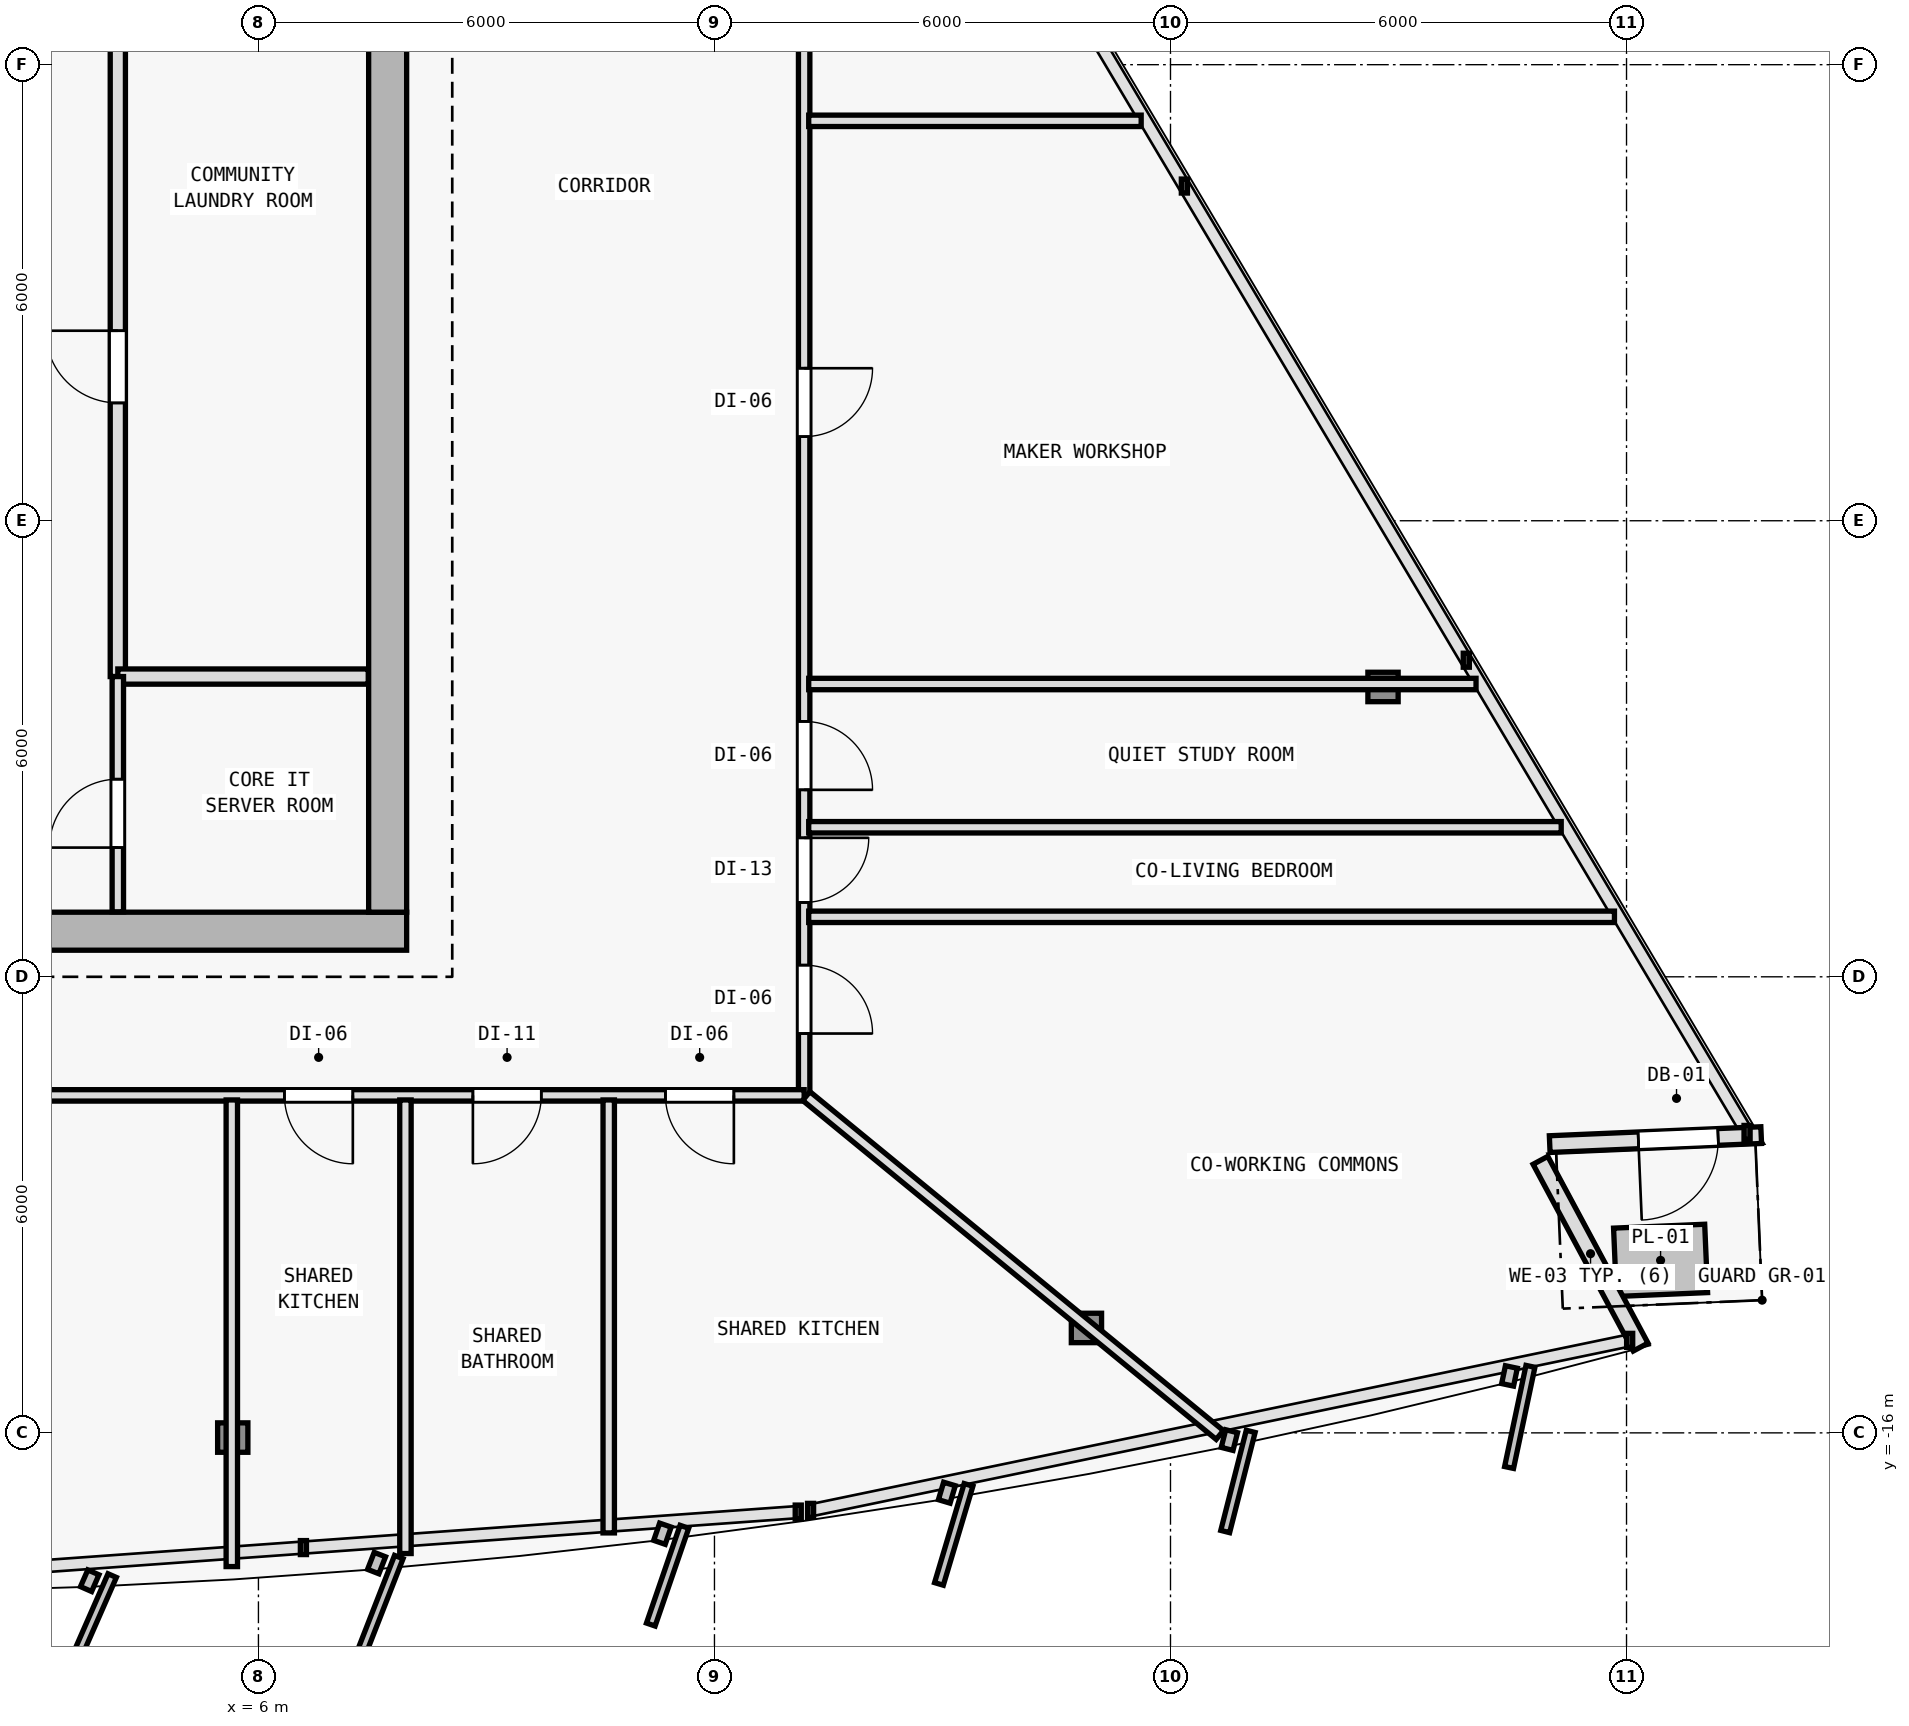
"""IFC4 building model, lengths in metres.
Left out: names, types, materials, properties, quantities, classifications, styles, units other than length and angle.
Written with IfcOpenShell. Run it as: python <this file> out.ifc"""

import sys

from ifc_helpers import new_model, si_unit, direction, frame, frame_2d, origin, origin_2d, place, context, subcontext, project, spatial, rectangle, i_section, extrude, element, fill, save


model = new_model("IFC4")
c1 = context("Model", 3, precision=1e-05, world=origin(), true_north=direction((0.0, 1.0)))
c2 = subcontext(c1, "Body", "Model", "MODEL_VIEW")
j1 = project(units=[si_unit("LENGTHUNIT", "METRE"), si_unit("PLANEANGLEUNIT", "RADIAN")], contexts=[c1])
p1 = place(None, origin())
s1 = spatial("IfcSite", under=j1, at=p1, CompositionType="ELEMENT")
p2 = place(p1, origin())
s2 = spatial("IfcBuilding", under=s1, at=p2, CompositionType="ELEMENT")
p3 = place(p2, frame((0.0, 0.0, 201.9)))
s3 = spatial("IfcBuildingStorey", under=s2, at=p3, CompositionType="ELEMENT", Elevation=201.9)
for number, where, z_axis, x_axis in (
    (1, (7.7, -9.4, 0.0), (0.0, 0.0, 1.0), (1.0, 0.0, 0.0)),
    (2, (7.7, 0.4, 0.0), (0.0, 0.0, 1.0), (1.0, 0.0, 0.0)),
):
    element("IfcColumn", number, at=place(p3, frame(where, z_axis=z_axis, x_axis=x_axis)), inside=s3, PredefinedType="COLUMN", context=c2, shape_type="SweptSolid", body=[
        extrude(i_section(OverallWidth=0.398, OverallDepth=0.387, WebThickness=0.013, FlangeThickness=0.022, FilletRadius=0.015, at=origin_2d()), origin(), (0.0, 0.0, 1.0), 3.6),
    ])
p4 = place(p3, frame((5.662, -16.062, 0.006), z_axis=(-0.006934304776, 0.03521539092, 0.999355688261), x_axis=(-0.981159154887, -0.193201223549, 0.0)))
e3 = element("IfcColumn", 3, at=p4, inside=s3, PredefinedType="COLUMN", context=c2, shape_type="SweptSolid", body=[
    extrude(i_section(OverallWidth=0.398, OverallDepth=0.387, WebThickness=0.013, FlangeThickness=0.022, FilletRadius=0.015, at=origin_2d()), origin(), (0.0, 0.0, 1.0), 3.591),
])
p5 = place(p3, frame((16.894, -14.62, 0.006), z_axis=(-0.020596339702, 0.033443561496, 0.99922836178), x_axis=(-0.851480003019, -0.52438707503, 0.0)))
e4 = element("IfcColumn", 4, at=p5, inside=s3, PredefinedType="COLUMN", context=c2, shape_type="SweptSolid", body=[
    extrude(i_section(OverallWidth=0.398, OverallDepth=0.387, WebThickness=0.013, FlangeThickness=0.022, FilletRadius=0.015, at=origin_2d()), origin(), (0.0, 0.0, 1.0), 3.592),
])
p6 = place(p3, frame((20.796, -6.187, 0.006), z_axis=(-0.026107436898, 0.021620221181, 0.999425318758), x_axis=(-0.637813971185, -0.770190455771, 0.0)))
e5 = element("IfcColumn", 5, at=p6, inside=s3, PredefinedType="COLUMN", context=c2, shape_type="SweptSolid", body=[
    extrude(i_section(OverallWidth=0.398, OverallDepth=0.387, WebThickness=0.013, FlangeThickness=0.022, FilletRadius=0.015, at=origin_2d()), origin(), (0.0, 0.0, 1.0), 3.591),
])
p7 = place(p3, frame((22.868, -12.415, 0.0), z_axis=(0.0, 0.0, 1.0), x_axis=(0.472845900162, -0.881145138272, 0.0)))
e6 = element("IfcWall", 6, at=p7, inside=s3, PredefinedType="SOLIDWALL", context=c2, shape_type="SweptSolid", body=[
    extrude(rectangle(XDim=2.788, YDim=0.22, at=frame_2d((1.394, 0.0))), origin(), (0.0, 0.0, 1.0), 3.35),
])
p8 = place(p3, frame((25.772, -12.083, 0.0), z_axis=(0.0, 0.0, 1.0), x_axis=(-0.999095761456, -0.042516578425, 0.0)))
e7 = element("IfcWall", 7, at=p8, inside=s3, PredefinedType="SOLIDWALL", context=c2, shape_type="SweptSolid", body=[
    extrude(rectangle(XDim=2.785, YDim=0.22, at=frame_2d((1.393, 0.0))), origin(), (0.0, 0.0, 1.0), 3.35),
])
p9 = place(p8, frame((0.567, 0.0, 0.0)))
e8 = element("IfcOpeningElement", 8, at=p9, cuts=e7, PredefinedType="OPENING", context=c2, shape_type="SweptSolid", body=[
    extrude(rectangle(XDim=1.05, YDim=2.15, at=frame_2d((0.525, 1.075))), frame((0.0, 0.12, 0.0), z_axis=(0.0, -1.0, 0.0), x_axis=(1.0, 0.0, 0.0)), (0.0, 0.0, 1.0), 0.24),
])
p10 = place(p3, frame((-7.95, -9.4, 0.0), z_axis=(0.0, 0.0, 1.0), x_axis=(1.0, 0.0, 0.0)))
e9 = element("IfcWall", 9, at=p10, inside=s3, PredefinedType="SHEAR", context=c2, shape_type="SweptSolid", body=[
    extrude(rectangle(XDim=15.9, YDim=0.5, at=frame_2d((7.95, 0.0))), origin(), (0.0, 0.0, 1.0), 3.35),
])
p11 = place(p10, frame((9.6, 0.0, 0.0)))
e10 = element("IfcOpeningElement", 10, at=p11, cuts=e9, PredefinedType="OPENING", context=c2, shape_type="SweptSolid", body=[
    extrude(rectangle(XDim=1.5, YDim=2.2, at=frame_2d((0.75, 1.1))), frame((0.0, 0.26, 0.0), z_axis=(0.0, -1.0, 0.0), x_axis=(1.0, 0.0, 0.0)), (0.0, 0.0, 1.0), 0.52),
])
p12 = place(p3, frame((7.7, 9.95, 0.0), z_axis=(0.0, 0.0, 1.0), x_axis=(0.0, -1.0, 0.0)))
e11 = element("IfcWall", 11, at=p12, inside=s3, PredefinedType="SHEAR", context=c2, shape_type="SweptSolid", body=[
    extrude(rectangle(XDim=19.1, YDim=0.5, at=frame_2d((9.55, 0.0))), origin(), (0.0, 0.0, 1.0), 3.35),
])
p13 = place(p3, frame((4.15, -6.05, 0.0), z_axis=(0.0, 0.0, 1.0), x_axis=(0.0, 1.0, 0.0)))
e12 = element("IfcWall", 12, at=p13, inside=s3, PredefinedType="SOLIDWALL", context=c2, shape_type="SweptSolid", body=[
    extrude(rectangle(XDim=8.7, YDim=0.2, at=frame_2d((4.35, 0.0))), origin(), (0.0, 0.0, 1.0), 3.35),
])
p14 = place(p13, frame((3.6, 0.0, 0.0)))
e13 = element("IfcOpeningElement", 13, at=p14, cuts=e12, PredefinedType="OPENING", context=c2, shape_type="SweptSolid", body=[
    extrude(rectangle(XDim=0.95, YDim=2.1, at=frame_2d((0.475, 1.05))), frame((0.0, 0.11, 0.0), z_axis=(0.0, -1.0, 0.0), x_axis=(1.0, 0.0, 0.0)), (0.0, 0.0, 1.0), 0.22),
])
p15 = place(p3, frame((4.15, -6.05, 0.0), z_axis=(0.0, 0.0, 1.0), x_axis=(1.0, 0.0, 0.0)))
e14 = element("IfcWall", 14, at=p15, inside=s3, PredefinedType="SOLIDWALL", context=c2, shape_type="SweptSolid", body=[
    extrude(rectangle(XDim=3.295, YDim=0.2, at=frame_2d((1.647, 0.0))), origin(), (0.0, 0.0, 1.0), 3.35),
])
p16 = place(p3, frame((4.15, -9.145, 0.0), z_axis=(0.0, 0.0, 1.0), x_axis=(0.0, 1.0, 0.0)))
e15 = element("IfcWall", 15, at=p16, inside=s3, PredefinedType="PARTITIONING", context=c2, shape_type="SweptSolid", body=[
    extrude(rectangle(XDim=3.095, YDim=0.15, at=frame_2d((1.547, 0.0))), origin(), (0.0, 0.0, 1.0), 3.35),
])
p17 = place(p16, frame((0.845, 0.0, 0.0)))
e16 = element("IfcOpeningElement", 16, at=p17, cuts=e15, PredefinedType="OPENING", context=c2, shape_type="SweptSolid", body=[
    extrude(rectangle(XDim=0.9, YDim=2.1, at=frame_2d((0.45, 1.05))), frame((0.0, 0.085, 0.0), z_axis=(0.0, -1.0, 0.0), x_axis=(1.0, 0.0, 0.0)), (0.0, 0.0, 1.0), 0.17),
])
p18 = place(p3, frame((13.18, 8.444, 0.0), z_axis=(0.0, 0.0, 1.0), x_axis=(0.0, -1.0, 0.0)))
e17 = element("IfcWall", 17, at=p18, inside=s3, PredefinedType="PARTITIONING", context=c2, shape_type="SweptSolid", body=[
    extrude(rectangle(XDim=20.004, YDim=0.15, at=frame_2d((10.002, 0.0))), origin(), (0.0, 0.0, 1.0), 2.825),
])
p19 = place(p18, frame((18.29, 0.0, 0.0)))
e18 = element("IfcOpeningElement", 18, at=p19, cuts=e17, PredefinedType="OPENING", context=c2, shape_type="SweptSolid", body=[
    extrude(rectangle(XDim=0.9, YDim=2.1, at=frame_2d((0.45, 1.05))), frame((0.0, 0.085, 0.0), z_axis=(0.0, -1.0, 0.0), x_axis=(1.0, 0.0, 0.0)), (0.0, 0.0, 1.0), 0.17),
])
p20 = place(p18, frame((16.615, 0.0, 0.0)))
e19 = element("IfcOpeningElement", 19, at=p20, cuts=e17, PredefinedType="OPENING", context=c2, shape_type="SweptSolid", body=[
    extrude(rectangle(XDim=0.85, YDim=2.1, at=frame_2d((0.425, 1.05))), frame((0.0, 0.085, 0.0), z_axis=(0.0, -1.0, 0.0), x_axis=(1.0, 0.0, 0.0)), (0.0, 0.0, 1.0), 0.17),
])
p21 = place(p18, frame((15.084, 0.0, 0.0)))
e20 = element("IfcOpeningElement", 20, at=p21, cuts=e17, PredefinedType="OPENING", context=c2, shape_type="SweptSolid", body=[
    extrude(rectangle(XDim=0.9, YDim=2.1, at=frame_2d((0.45, 1.05))), frame((0.0, 0.085, 0.0), z_axis=(0.0, -1.0, 0.0), x_axis=(1.0, 0.0, 0.0)), (0.0, 0.0, 1.0), 0.17),
])
p22 = place(p18, frame((10.437, 0.0, 0.0)))
e21 = element("IfcOpeningElement", 21, at=p22, cuts=e17, PredefinedType="OPENING", context=c2, shape_type="SweptSolid", body=[
    extrude(rectangle(XDim=0.9, YDim=2.1, at=frame_2d((0.45, 1.05))), frame((0.0, 0.085, 0.0), z_axis=(0.0, -1.0, 0.0), x_axis=(1.0, 0.0, 0.0)), (0.0, 0.0, 1.0), 0.17),
])
p23 = place(p3, frame((13.18, -11.56, 0.0), z_axis=(0.0, 0.0, 1.0), x_axis=(-1.0, 0.0, 0.0)))
e22 = element("IfcWall", 22, at=p23, inside=s3, PredefinedType="PARTITIONING", context=c2, shape_type="SweptSolid", body=[
    extrude(rectangle(XDim=23.04, YDim=0.15, at=frame_2d((11.52, 0.0))), origin(), (0.0, 0.0, 1.0), 2.775),
])
p24 = place(p23, frame((14.436, 0.0, 0.0)))
e23 = element("IfcOpeningElement", 23, at=p24, cuts=e22, PredefinedType="OPENING", context=c2, shape_type="SweptSolid", body=[
    extrude(rectangle(XDim=0.9, YDim=2.1, at=frame_2d((0.45, 1.05))), frame((0.0, 0.085, 0.0), z_axis=(0.0, -1.0, 0.0), x_axis=(1.0, 0.0, 0.0)), (0.0, 0.0, 1.0), 0.17),
])
p25 = place(p23, frame((5.938, 0.0, 0.0)))
e24 = element("IfcOpeningElement", 24, at=p25, cuts=e22, PredefinedType="OPENING", context=c2, shape_type="SweptSolid", body=[
    extrude(rectangle(XDim=0.9, YDim=2.1, at=frame_2d((0.45, 1.05))), frame((0.0, 0.085, 0.0), z_axis=(0.0, -1.0, 0.0), x_axis=(1.0, 0.0, 0.0)), (0.0, 0.0, 1.0), 0.17),
])
p26 = place(p23, frame((3.458, 0.0, 0.0)))
e25 = element("IfcOpeningElement", 25, at=p26, cuts=e22, PredefinedType="OPENING", context=c2, shape_type="SweptSolid", body=[
    extrude(rectangle(XDim=0.9, YDim=2.1, at=frame_2d((0.45, 1.05))), frame((0.0, 0.085, 0.0), z_axis=(0.0, -1.0, 0.0), x_axis=(1.0, 0.0, 0.0)), (0.0, 0.0, 1.0), 0.17),
])
p27 = place(p23, frame((0.925, 0.0, 0.0)))
e26 = element("IfcOpeningElement", 26, at=p27, cuts=e22, PredefinedType="OPENING", context=c2, shape_type="SweptSolid", body=[
    extrude(rectangle(XDim=0.9, YDim=2.1, at=frame_2d((0.45, 1.05))), frame((0.0, 0.085, 0.0), z_axis=(0.0, -1.0, 0.0), x_axis=(1.0, 0.0, 0.0)), (0.0, 0.0, 1.0), 0.17),
])
p28 = place(p3, frame((5.65, -11.62, 0.0), z_axis=(0.0, 0.0, 1.0), x_axis=(0.0, -1.0, 0.0)))
e27 = element("IfcWall", 27, at=p28, inside=s3, PredefinedType="PARTITIONING", context=c2, shape_type="SweptSolid", body=[
    extrude(rectangle(XDim=6.139, YDim=0.15, at=frame_2d((3.07, 0.0))), origin(), (0.0, 0.0, 1.0), 2.775),
])
p29 = place(p3, frame((13.208, -11.569, 0.0), z_axis=(0.0, 0.0, 1.0), x_axis=(0.773432829445, -0.633878267758, 0.0)))
e28 = element("IfcWall", 28, at=p29, inside=s3, PredefinedType="PARTITIONING", context=c2, shape_type="SweptSolid", body=[
    extrude(rectangle(XDim=7.034, YDim=0.15, at=frame_2d((3.517, 0.0))), origin(), (0.0, 0.0, 1.0), 2.825),
])
p30 = place(p3, frame((13.24, -6.148, 0.0), z_axis=(0.0, 0.0, 1.0), x_axis=(1.0, 0.0, 0.0)))
e29 = element("IfcWall", 29, at=p30, inside=s3, PredefinedType="PARTITIONING", context=c2, shape_type="SweptSolid", body=[
    extrude(rectangle(XDim=8.78, YDim=0.15, at=frame_2d((4.39, 0.0))), origin(), (0.0, 0.0, 1.0), 2.825),
])
p31 = place(p3, frame((10.609, -11.62, 0.0), z_axis=(0.0, 0.0, 1.0), x_axis=(0.0, -1.0, 0.0)))
e30 = element("IfcWall", 30, at=p31, inside=s3, PredefinedType="PARTITIONING", context=c2, shape_type="SweptSolid", body=[
    extrude(rectangle(XDim=5.696, YDim=0.15, at=frame_2d((2.848, 0.0))), origin(), (0.0, 0.0, 1.0), 2.875),
])
p32 = place(p3, frame((13.24, -9.211, 0.0), z_axis=(0.0, 0.0, 1.0), x_axis=(1.0, 0.0, 0.0)))
e31 = element("IfcWall", 31, at=p32, inside=s3, PredefinedType="PARTITIONING", context=c2, shape_type="SweptSolid", body=[
    extrude(rectangle(XDim=10.601, YDim=0.15, at=frame_2d((5.301, 0.0))), origin(), (0.0, 0.0, 1.0), 2.935),
])
p33 = place(p3, frame((7.934, -11.62, 0.0), z_axis=(0.0, 0.0, 1.0), x_axis=(0.0, -1.0, 0.0)))
e32 = element("IfcWall", 32, at=p33, inside=s3, PredefinedType="PARTITIONING", context=c2, shape_type="SweptSolid", body=[
    extrude(rectangle(XDim=5.968, YDim=0.15, at=frame_2d((2.984, 0.0))), origin(), (0.0, 0.0, 1.0), 2.875),
])
p34 = place(p3, frame((13.24, -8.033, 0.0), z_axis=(0.0, 0.0, 1.0), x_axis=(1.0, 0.0, 0.0)))
e33 = element("IfcWall", 33, at=p34, inside=s3, PredefinedType="PARTITIONING", context=c2, shape_type="SweptSolid", body=[
    extrude(rectangle(XDim=9.901, YDim=0.15, at=frame_2d((4.95, 0.0))), origin(), (0.0, 0.0, 1.0), 2.825),
])
p35 = place(p3, frame((13.24, 1.261, 0.0), z_axis=(0.0, 0.0, 1.0), x_axis=(1.0, 0.0, 0.0)))
e34 = element("IfcWall", 34, at=p35, inside=s3, PredefinedType="PARTITIONING", context=c2, shape_type="SweptSolid", body=[
    extrude(rectangle(XDim=4.374, YDim=0.15, at=frame_2d((2.187, 0.0))), origin(), (0.0, 0.0, 1.0), 2.935),
])
p36 = place(p9, origin())
e35 = element("IfcDoor", 35, at=p36, inside=s3, OperationType="SINGLE_SWING_RIGHT", PredefinedType="DOOR", context=c2, shape_type="SweptSolid", body=[
    extrude(rectangle(XDim=1.05, YDim=2.15, at=frame_2d((0.525, 1.075))), frame((0.0, 0.025, 0.0), z_axis=(0.0, -1.0, 0.0), x_axis=(1.0, 0.0, 0.0)), (0.0, 0.0, 1.0), 0.05),
])
fill(e8, e35)
p37 = place(p14, origin())
e36 = element("IfcDoor", 36, at=p37, inside=s3, OperationType="SINGLE_SWING_RIGHT", PredefinedType="DOOR", context=c2, shape_type="SweptSolid", body=[
    extrude(rectangle(XDim=0.95, YDim=2.1, at=frame_2d((0.475, 1.05))), frame((0.0, 0.025, 0.0), z_axis=(0.0, -1.0, 0.0), x_axis=(1.0, 0.0, 0.0)), (0.0, 0.0, 1.0), 0.05),
])
fill(e13, e36)
p38 = place(p17, origin())
e37 = element("IfcDoor", 37, at=p38, inside=s3, OperationType="SINGLE_SWING_LEFT", PredefinedType="DOOR", context=c2, shape_type="SweptSolid", body=[
    extrude(rectangle(XDim=0.9, YDim=2.1, at=frame_2d((0.45, 1.05))), frame((0.0, 0.025, 0.0), z_axis=(0.0, -1.0, 0.0), x_axis=(1.0, 0.0, 0.0)), (0.0, 0.0, 1.0), 0.05),
])
fill(e16, e37)
p39 = place(p25, origin())
e38 = element("IfcDoor", 38, at=p39, inside=s3, OperationType="SINGLE_SWING_LEFT", PredefinedType="DOOR", context=c2, shape_type="SweptSolid", body=[
    extrude(rectangle(XDim=0.9, YDim=2.1, at=frame_2d((0.45, 1.05))), frame((0.0, 0.025, 0.0), z_axis=(0.0, -1.0, 0.0), x_axis=(1.0, 0.0, 0.0)), (0.0, 0.0, 1.0), 0.05),
])
fill(e24, e38)
p40 = place(p26, origin())
e39 = element("IfcDoor", 39, at=p40, inside=s3, OperationType="SINGLE_SWING_RIGHT", PredefinedType="DOOR", context=c2, shape_type="SweptSolid", body=[
    extrude(rectangle(XDim=0.9, YDim=2.1, at=frame_2d((0.45, 1.05))), frame((0.0, 0.025, 0.0), z_axis=(0.0, -1.0, 0.0), x_axis=(1.0, 0.0, 0.0)), (0.0, 0.0, 1.0), 0.05),
])
fill(e25, e39)
p41 = place(p27, origin())
e40 = element("IfcDoor", 40, at=p41, inside=s3, OperationType="SINGLE_SWING_LEFT", PredefinedType="DOOR", context=c2, shape_type="SweptSolid", body=[
    extrude(rectangle(XDim=0.9, YDim=2.1, at=frame_2d((0.45, 1.05))), frame((0.0, 0.025, 0.0), z_axis=(0.0, -1.0, 0.0), x_axis=(1.0, 0.0, 0.0)), (0.0, 0.0, 1.0), 0.05),
])
fill(e26, e40)
p42 = place(p19, origin())
e41 = element("IfcDoor", 41, at=p42, inside=s3, OperationType="SINGLE_SWING_RIGHT", PredefinedType="DOOR", context=c2, shape_type="SweptSolid", body=[
    extrude(rectangle(XDim=0.9, YDim=2.1, at=frame_2d((0.45, 1.05))), frame((0.0, 0.025, 0.0), z_axis=(0.0, -1.0, 0.0), x_axis=(1.0, 0.0, 0.0)), (0.0, 0.0, 1.0), 0.05),
])
fill(e18, e41)
p43 = place(p20, origin())
e42 = element("IfcDoor", 42, at=p43, inside=s3, OperationType="SINGLE_SWING_LEFT", PredefinedType="DOOR", context=c2, shape_type="SweptSolid", body=[
    extrude(rectangle(XDim=0.85, YDim=2.1, at=frame_2d((0.425, 1.05))), frame((0.0, 0.025, 0.0), z_axis=(0.0, -1.0, 0.0), x_axis=(1.0, 0.0, 0.0)), (0.0, 0.0, 1.0), 0.05),
])
fill(e19, e42)
p44 = place(p21, origin())
e43 = element("IfcDoor", 43, at=p44, inside=s3, OperationType="SINGLE_SWING_RIGHT", PredefinedType="DOOR", context=c2, shape_type="SweptSolid", body=[
    extrude(rectangle(XDim=0.9, YDim=2.1, at=frame_2d((0.45, 1.05))), frame((0.0, 0.025, 0.0), z_axis=(0.0, -1.0, 0.0), x_axis=(1.0, 0.0, 0.0)), (0.0, 0.0, 1.0), 0.05),
])
fill(e20, e43)
p45 = place(p22, origin())
e44 = element("IfcDoor", 44, at=p45, inside=s3, OperationType="SINGLE_SWING_LEFT", PredefinedType="DOOR", context=c2, shape_type="SweptSolid", body=[
    extrude(rectangle(XDim=0.9, YDim=2.1, at=frame_2d((0.45, 1.05))), frame((0.0, 0.025, 0.0), z_axis=(0.0, -1.0, 0.0), x_axis=(1.0, 0.0, 0.0)), (0.0, 0.0, 1.0), 0.05),
])
fill(e21, e44)
save(model, sys.argv[1])
